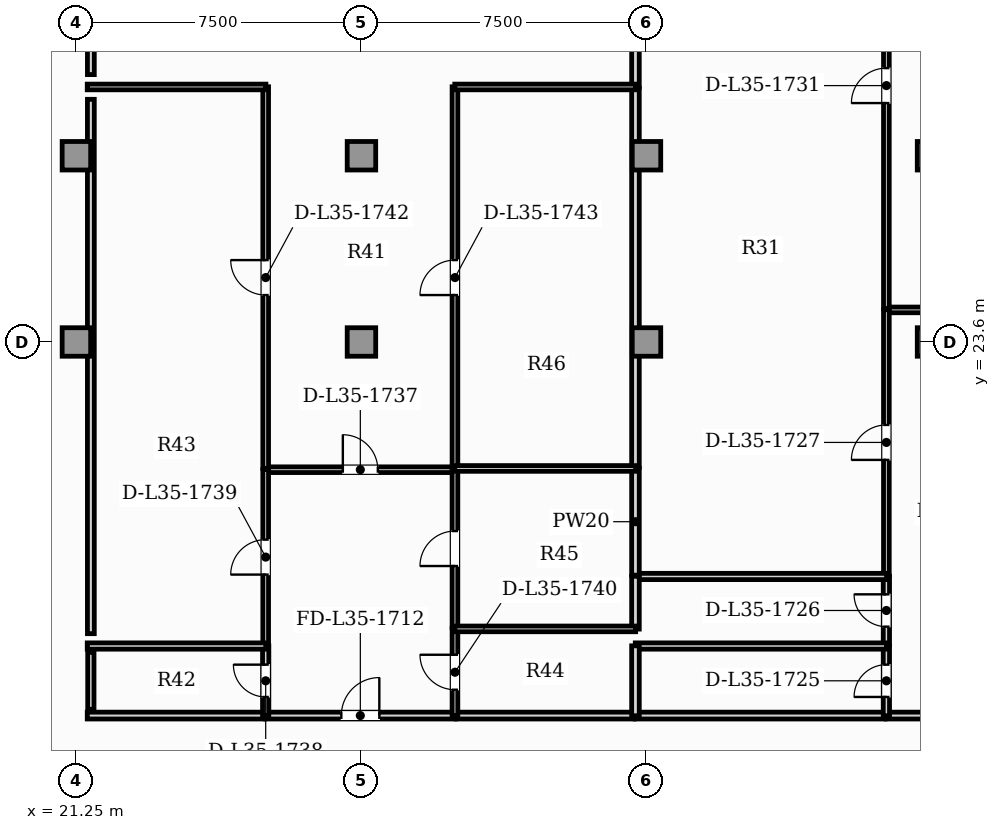
"""IFC4 building model, lengths in metres.
Left out: names, types, materials, properties, quantities, classifications, styles, units other than length and angle.
Written with IfcOpenShell. Run it as: python <this file> out.ifc"""

import sys

from ifc_helpers import new_model, si_unit, direction, frame, frame_2d, origin, origin_2d, place, context, subcontext, project, spatial, rectangle, extrude, element, fill, save


model = new_model("IFC4")
c1 = context("Model", 3, precision=1e-05, world=origin(), true_north=direction((0.0, 1.0)))
c2 = subcontext(c1, "Body", "Model", "MODEL_VIEW")
j1 = project(units=[si_unit("LENGTHUNIT", "METRE"), si_unit("PLANEANGLEUNIT", "RADIAN")], contexts=[c1])
p1 = place(None, origin())
s1 = spatial("IfcSite", under=j1, at=p1, CompositionType="ELEMENT")
p2 = place(p1, origin())
s2 = spatial("IfcBuilding", under=s1, at=p2, CompositionType="ELEMENT")
p3 = place(p2, frame((0.0, 0.0, 145.2)))
s3 = spatial("IfcBuildingStorey", under=s2, at=p3, CompositionType="ELEMENT", Elevation=145.2)
for number, where, z_axis, x_axis in (
    (1, (21.25, 23.6, 0.0), (0.0, 0.0, 1.0), (1.0, 0.0, 0.0)),
    (2, (28.75, 23.6, 0.0), (0.0, 0.0, 1.0), (1.0, 0.0, 0.0)),
    (3, (36.25, 23.6, 0.0), (0.0, 0.0, 1.0), (1.0, 0.0, 0.0)),
    (4, (43.75, 23.6, 0.0), (0.0, 0.0, 1.0), (1.0, 0.0, 0.0)),
    (5, (21.25, 28.5, 0.0), (0.0, 0.0, 1.0), (1.0, 0.0, 0.0)),
    (6, (28.75, 28.5, 0.0), (0.0, 0.0, 1.0), (1.0, 0.0, 0.0)),
    (7, (36.25, 28.5, 0.0), (0.0, 0.0, 1.0), (1.0, 0.0, 0.0)),
    (8, (43.75, 28.5, 0.0), (0.0, 0.0, 1.0), (1.0, 0.0, 0.0)),
):
    element("IfcColumn", number, at=place(p3, frame(where, z_axis=z_axis, x_axis=x_axis)), inside=s3, PredefinedType="COLUMN", context=c2, shape_type="SweptSolid", body=[
        extrude(rectangle(XDim=0.75, YDim=0.75, at=origin_2d()), origin(), (0.0, 0.0, 1.0), 3.85),
    ])
p4 = place(p3, frame((42.557, 13.77, 0.0), z_axis=(0.0, 0.0, 1.0), x_axis=(1.0, 0.0, 0.0)))
e9 = element("IfcWall", 9, at=p4, inside=s3, PredefinedType="PARTITIONING", context=c2, shape_type="SweptSolid", body=[
    extrude(rectangle(XDim=4.99, YDim=0.18, at=frame_2d((2.495, 0.0))), origin(), (0.0, 0.0, 1.0), 3.63),
])
p5 = place(p4, frame((1.995, 0.0, 0.0)))
e10 = element("IfcOpeningElement", 10, at=p5, cuts=e9, PredefinedType="OPENING", context=c2, shape_type="SweptSolid", body=[
    extrude(rectangle(XDim=1.0, YDim=2.15, at=frame_2d((0.5, 1.075))), frame((0.0, 0.1, 0.0), z_axis=(0.0, -1.0, 0.0), x_axis=(1.0, 0.0, 0.0)), (0.0, 0.0, 1.0), 0.2),
])
p6 = place(p3, frame((35.955, 13.77, 0.0), z_axis=(0.0, 0.0, 1.0), x_axis=(1.0, 0.0, 0.0)))
e11 = element("IfcWall", 11, at=p6, inside=s3, PredefinedType="PARTITIONING", context=c2, shape_type="SweptSolid", body=[
    extrude(rectangle(XDim=6.572, YDim=0.18, at=frame_2d((3.286, 0.0))), origin(), (0.0, 0.0, 1.0), 3.63),
])
p7 = place(p3, frame((26.225, 13.77, 0.0), z_axis=(0.0, 0.0, 1.0), x_axis=(1.0, 0.0, 0.0)))
e12 = element("IfcWall", 12, at=p7, inside=s3, PredefinedType="PARTITIONING", context=c2, shape_type="SweptSolid", body=[
    extrude(rectangle(XDim=4.99, YDim=0.18, at=frame_2d((2.495, 0.0))), origin(), (0.0, 0.0, 1.0), 3.63),
])
p8 = place(p7, frame((1.995, 0.0, 0.0)))
e13 = element("IfcOpeningElement", 13, at=p8, cuts=e12, PredefinedType="OPENING", context=c2, shape_type="SweptSolid", body=[
    extrude(rectangle(XDim=1.0, YDim=2.15, at=frame_2d((0.5, 1.075))), frame((0.0, 0.1, 0.0), z_axis=(0.0, -1.0, 0.0), x_axis=(1.0, 0.0, 0.0)), (0.0, 0.0, 1.0), 0.2),
])
p9 = place(p3, frame((21.535, 13.77, 0.0), z_axis=(0.0, 0.0, 1.0), x_axis=(1.0, 0.0, 0.0)))
e14 = element("IfcWall", 14, at=p9, inside=s3, PredefinedType="PARTITIONING", context=c2, shape_type="SweptSolid", body=[
    extrude(rectangle(XDim=4.66, YDim=0.18, at=frame_2d((2.33, 0.0))), origin(), (0.0, 0.0, 1.0), 3.63),
])
p10 = place(p3, frame((31.245, 13.77, 0.0), z_axis=(0.0, 0.0, 1.0), x_axis=(1.0, 0.0, 0.0)))
e15 = element("IfcWall", 15, at=p10, inside=s3, PredefinedType="PARTITIONING", context=c2, shape_type="SweptSolid", body=[
    extrude(rectangle(XDim=4.68, YDim=0.18, at=frame_2d((2.34, 0.0))), origin(), (0.0, 0.0, 1.0), 3.63),
])
p11 = place(p3, frame((42.557, 24.444, 0.0), z_axis=(0.0, 0.0, 1.0), x_axis=(1.0, 0.0, 0.0)))
e16 = element("IfcWall", 16, at=p11, inside=s3, PredefinedType="PARTITIONING", context=c2, shape_type="SweptSolid", body=[
    extrude(rectangle(XDim=4.99, YDim=0.15, at=frame_2d((2.495, 0.0))), origin(), (0.0, 0.0, 1.0), 3.63),
])
p12 = place(p11, frame((2.035, 0.0, 0.0)))
e17 = element("IfcOpeningElement", 17, at=p12, cuts=e16, PredefinedType="OPENING", context=c2, shape_type="SweptSolid", body=[
    extrude(rectangle(XDim=0.92, YDim=2.1, at=frame_2d((0.46, 1.05))), frame((0.0, 0.085, 0.0), z_axis=(0.0, -1.0, 0.0), x_axis=(1.0, 0.0, 0.0)), (0.0, 0.0, 1.0), 0.17),
])
p13 = place(p3, frame((42.562, 13.765, 0.0), z_axis=(0.0, 0.0, 1.0), x_axis=(0.0, 1.0, 0.0)))
e18 = element("IfcWall", 18, at=p13, inside=s3, PredefinedType="PLUMBINGWALL", context=c2, shape_type="SweptSolid", body=[
    extrude(rectangle(XDim=1.84, YDim=0.165, at=frame_2d((0.92, 0.0))), origin(), (0.0, 0.0, 1.0), 3.63),
])
p14 = place(p13, frame((0.495, 0.0, 0.0)))
e19 = element("IfcOpeningElement", 19, at=p14, cuts=e18, PredefinedType="OPENING", context=c2, shape_type="SweptSolid", body=[
    extrude(rectangle(XDim=0.85, YDim=2.1, at=frame_2d((0.425, 1.05))), frame((0.0, 0.093, 0.0), z_axis=(0.0, -1.0, 0.0), x_axis=(1.0, 0.0, 0.0)), (0.0, 0.0, 1.0), 0.185),
])
p15 = place(p3, frame((42.562, 15.635, 0.0), z_axis=(0.0, 0.0, 1.0), x_axis=(0.0, 1.0, 0.0)))
e20 = element("IfcWall", 20, at=p15, inside=s3, PredefinedType="PLUMBINGWALL", context=c2, shape_type="SweptSolid", body=[
    extrude(rectangle(XDim=1.8, YDim=0.165, at=frame_2d((0.9, 0.0))), origin(), (0.0, 0.0, 1.0), 3.63),
])
p16 = place(p15, frame((0.475, 0.0, 0.0)))
e21 = element("IfcOpeningElement", 21, at=p16, cuts=e20, PredefinedType="OPENING", context=c2, shape_type="SweptSolid", body=[
    extrude(rectangle(XDim=0.85, YDim=2.1, at=frame_2d((0.425, 1.05))), frame((0.0, 0.093, 0.0), z_axis=(0.0, -1.0, 0.0), x_axis=(1.0, 0.0, 0.0)), (0.0, 0.0, 1.0), 0.185),
])
p17 = place(p3, frame((42.562, 17.465, 0.0), z_axis=(0.0, 0.0, 1.0), x_axis=(0.0, 1.0, 0.0)))
e22 = element("IfcWall", 22, at=p17, inside=s3, PredefinedType="PARTITIONING", context=c2, shape_type="SweptSolid", body=[
    extrude(rectangle(XDim=6.984, YDim=0.15, at=frame_2d((3.492, 0.0))), origin(), (0.0, 0.0, 1.0), 3.63),
])
p18 = place(p17, frame((3.032, 0.0, 0.0)))
e23 = element("IfcOpeningElement", 23, at=p18, cuts=e22, PredefinedType="OPENING", context=c2, shape_type="SweptSolid", body=[
    extrude(rectangle(XDim=0.92, YDim=2.1, at=frame_2d((0.46, 1.05))), frame((0.0, 0.085, 0.0), z_axis=(0.0, -1.0, 0.0), x_axis=(1.0, 0.0, 0.0)), (0.0, 0.0, 1.0), 0.17),
])
p19 = place(p3, frame((42.562, 24.479, 0.0), z_axis=(0.0, 0.0, 1.0), x_axis=(0.0, 1.0, 0.0)))
e24 = element("IfcWall", 24, at=p19, inside=s3, PredefinedType="PARTITIONING", context=c2, shape_type="SweptSolid", body=[
    extrude(rectangle(XDim=9.026, YDim=0.15, at=frame_2d((4.513, 0.0))), origin(), (0.0, 0.0, 1.0), 3.63),
])
p20 = place(p19, frame((5.407, 0.0, 0.0)))
e25 = element("IfcOpeningElement", 25, at=p20, cuts=e24, PredefinedType="OPENING", context=c2, shape_type="SweptSolid", body=[
    extrude(rectangle(XDim=0.92, YDim=2.1, at=frame_2d((0.46, 1.05))), frame((0.0, 0.085, 0.0), z_axis=(0.0, -1.0, 0.0), x_axis=(1.0, 0.0, 0.0)), (0.0, 0.0, 1.0), 0.17),
])
p21 = place(p3, frame((35.955, 15.6, 0.0), z_axis=(0.0, 0.0, 1.0), x_axis=(1.0, 0.0, 0.0)))
e26 = element("IfcWall", 26, at=p21, inside=s3, PredefinedType="PLUMBINGWALL", context=c2, shape_type="SweptSolid", body=[
    extrude(rectangle(XDim=6.612, YDim=0.165, at=frame_2d((3.306, 0.0))), origin(), (0.0, 0.0, 1.0), 3.63),
])
p22 = place(p3, frame((35.96, 13.765, 0.0), z_axis=(0.0, 0.0, 1.0), x_axis=(0.0, 1.0, 0.0)))
e27 = element("IfcWall", 27, at=p22, inside=s3, PredefinedType="PARTITIONING", context=c2, shape_type="SweptSolid", body=[
    extrude(rectangle(XDim=1.84, YDim=0.2, at=frame_2d((0.92, 0.0))), origin(), (0.0, 0.0, 1.0), 3.63),
])
p23 = place(p3, frame((35.955, 17.43, 0.0), z_axis=(0.0, 0.0, 1.0), x_axis=(1.0, 0.0, 0.0)))
e28 = element("IfcWall", 28, at=p23, inside=s3, PredefinedType="PLUMBINGWALL", context=c2, shape_type="SweptSolid", body=[
    extrude(rectangle(XDim=6.612, YDim=0.165, at=frame_2d((3.306, 0.0))), origin(), (0.0, 0.0, 1.0), 3.63),
])
p24 = place(p3, frame((35.96, 16.046, 0.0), z_axis=(0.0, 0.0, 1.0), x_axis=(0.0, 1.0, 0.0)))
e29 = element("IfcWall", 29, at=p24, inside=s3, PredefinedType="PARTITIONING", context=c2, shape_type="SweptSolid", body=[
    extrude(rectangle(XDim=1.389, YDim=0.2, at=frame_2d((0.695, 0.0))), origin(), (0.0, 0.0, 1.0), 3.63),
])
p25 = place(p3, frame((35.96, 30.305, 0.0), z_axis=(0.0, 0.0, 1.0), x_axis=(0.0, 1.0, 0.0)))
e30 = element("IfcWall", 30, at=p25, inside=s3, PredefinedType="PARTITIONING", context=c2, shape_type="SweptSolid", body=[
    extrude(rectangle(XDim=1.51, YDim=0.2, at=frame_2d((0.755, 0.0))), origin(), (0.0, 0.0, 1.0), 3.63),
])
p26 = place(p3, frame((35.96, 17.465, 0.0), z_axis=(0.0, 0.0, 1.0), x_axis=(0.0, 1.0, 0.0)))
e31 = element("IfcWall", 31, at=p26, inside=s3, PredefinedType="PARTITIONING", context=c2, shape_type="SweptSolid", body=[
    extrude(rectangle(XDim=2.812, YDim=0.2, at=frame_2d((1.406, 0.0))), origin(), (0.0, 0.0, 1.0), 3.63),
])
p27 = place(p3, frame((35.96, 20.308, 0.0), z_axis=(0.0, 0.0, 1.0), x_axis=(0.0, 1.0, 0.0)))
e32 = element("IfcWall", 32, at=p27, inside=s3, PredefinedType="PARTITIONING", context=c2, shape_type="SweptSolid", body=[
    extrude(rectangle(XDim=9.967, YDim=0.2, at=frame_2d((4.984, 0.0))), origin(), (0.0, 0.0, 1.0), 3.63),
])
p28 = place(p3, frame((26.225, 20.239, 0.0), z_axis=(0.0, 0.0, 1.0), x_axis=(1.0, 0.0, 0.0)))
e33 = element("IfcWall", 33, at=p28, inside=s3, PredefinedType="PARTITIONING", context=c2, shape_type="SweptSolid", body=[
    extrude(rectangle(XDim=4.99, YDim=0.15, at=frame_2d((2.495, 0.0))), origin(), (0.0, 0.0, 1.0), 3.63),
])
p29 = place(p28, frame((2.035, 0.0, 0.0)))
e34 = element("IfcOpeningElement", 34, at=p29, cuts=e33, PredefinedType="OPENING", context=c2, shape_type="SweptSolid", body=[
    extrude(rectangle(XDim=0.92, YDim=2.1, at=frame_2d((0.46, 1.05))), frame((0.0, 0.085, 0.0), z_axis=(0.0, -1.0, 0.0), x_axis=(1.0, 0.0, 0.0)), (0.0, 0.0, 1.0), 0.17),
])
p30 = place(p3, frame((26.23, 13.765, 0.0), z_axis=(0.0, 0.0, 1.0), x_axis=(0.0, 1.0, 0.0)))
e35 = element("IfcWall", 35, at=p30, inside=s3, PredefinedType="PLUMBINGWALL", context=c2, shape_type="SweptSolid", body=[
    extrude(rectangle(XDim=1.84, YDim=0.165, at=frame_2d((0.92, 0.0))), origin(), (0.0, 0.0, 1.0), 3.63),
])
p31 = place(p30, frame((0.495, 0.0, 0.0)))
e36 = element("IfcOpeningElement", 36, at=p31, cuts=e35, PredefinedType="OPENING", context=c2, shape_type="SweptSolid", body=[
    extrude(rectangle(XDim=0.85, YDim=2.1, at=frame_2d((0.425, 1.05))), frame((0.0, 0.093, 0.0), z_axis=(0.0, -1.0, 0.0), x_axis=(1.0, 0.0, 0.0)), (0.0, 0.0, 1.0), 0.185),
])
p32 = place(p3, frame((26.23, 15.635, 0.0), z_axis=(0.0, 0.0, 1.0), x_axis=(0.0, 1.0, 0.0)))
e37 = element("IfcWall", 37, at=p32, inside=s3, PredefinedType="PARTITIONING", context=c2, shape_type="SweptSolid", body=[
    extrude(rectangle(XDim=4.609, YDim=0.15, at=frame_2d((2.305, 0.0))), origin(), (0.0, 0.0, 1.0), 3.63),
])
p33 = place(p32, frame((1.844, 0.0, 0.0)))
e38 = element("IfcOpeningElement", 38, at=p33, cuts=e37, PredefinedType="OPENING", context=c2, shape_type="SweptSolid", body=[
    extrude(rectangle(XDim=0.92, YDim=2.1, at=frame_2d((0.46, 1.05))), frame((0.0, 0.085, 0.0), z_axis=(0.0, -1.0, 0.0), x_axis=(1.0, 0.0, 0.0)), (0.0, 0.0, 1.0), 0.17),
])
p34 = place(p3, frame((31.21, 13.765, 0.0), z_axis=(0.0, 0.0, 1.0), x_axis=(0.0, 1.0, 0.0)))
e39 = element("IfcWall", 39, at=p34, inside=s3, PredefinedType="PARTITIONING", context=c2, shape_type="SweptSolid", body=[
    extrude(rectangle(XDim=2.291, YDim=0.15, at=frame_2d((1.146, 0.0))), origin(), (0.0, 0.0, 1.0), 3.63),
])
p35 = place(p34, frame((0.685, 0.0, 0.0)))
e40 = element("IfcOpeningElement", 40, at=p35, cuts=e39, PredefinedType="OPENING", context=c2, shape_type="SweptSolid", body=[
    extrude(rectangle(XDim=0.92, YDim=2.1, at=frame_2d((0.46, 1.05))), frame((0.0, 0.085, 0.0), z_axis=(0.0, -1.0, 0.0), x_axis=(1.0, 0.0, 0.0)), (0.0, 0.0, 1.0), 0.17),
])
p36 = place(p3, frame((31.21, 16.086, 0.0), z_axis=(0.0, 0.0, 1.0), x_axis=(0.0, 1.0, 0.0)))
e41 = element("IfcWall", 41, at=p36, inside=s3, PredefinedType="PARTITIONING", context=c2, shape_type="SweptSolid", body=[
    extrude(rectangle(XDim=4.159, YDim=0.15, at=frame_2d((2.079, 0.0))), origin(), (0.0, 0.0, 1.0), 3.63),
])
p37 = place(p36, frame((1.619, 0.0, 0.0)))
e42 = element("IfcOpeningElement", 42, at=p37, cuts=e41, PredefinedType="OPENING", context=c2, shape_type="SweptSolid", body=[
    extrude(rectangle(XDim=0.92, YDim=2.1, at=frame_2d((0.46, 1.05))), frame((0.0, 0.085, 0.0), z_axis=(0.0, -1.0, 0.0), x_axis=(1.0, 0.0, 0.0)), (0.0, 0.0, 1.0), 0.17),
])
p38 = place(p3, frame((26.23, 20.274, 0.0), z_axis=(0.0, 0.0, 1.0), x_axis=(0.0, 1.0, 0.0)))
e43 = element("IfcWall", 43, at=p38, inside=s3, PredefinedType="PARTITIONING", context=c2, shape_type="SweptSolid", body=[
    extrude(rectangle(XDim=10.041, YDim=0.15, at=frame_2d((5.02, 0.0))), origin(), (0.0, 0.0, 1.0), 3.63),
])
p39 = place(p38, frame((4.56, 0.0, 0.0)))
e44 = element("IfcOpeningElement", 44, at=p39, cuts=e43, PredefinedType="OPENING", context=c2, shape_type="SweptSolid", body=[
    extrude(rectangle(XDim=0.92, YDim=2.1, at=frame_2d((0.46, 1.05))), frame((0.0, 0.085, 0.0), z_axis=(0.0, -1.0, 0.0), x_axis=(1.0, 0.0, 0.0)), (0.0, 0.0, 1.0), 0.17),
])
p40 = place(p3, frame((21.535, 30.31, 0.0), z_axis=(0.0, 0.0, 1.0), x_axis=(1.0, 0.0, 0.0)))
e45 = element("IfcWall", 45, at=p40, inside=s3, PredefinedType="PARTITIONING", context=c2, shape_type="SweptSolid", body=[
    extrude(rectangle(XDim=4.7, YDim=0.15, at=frame_2d((2.35, 0.0))), origin(), (0.0, 0.0, 1.0), 3.63),
])
p41 = place(p3, frame((31.21, 20.274, 0.0), z_axis=(0.0, 0.0, 1.0), x_axis=(0.0, 1.0, 0.0)))
e46 = element("IfcWall", 46, at=p41, inside=s3, PredefinedType="PARTITIONING", context=c2, shape_type="SweptSolid", body=[
    extrude(rectangle(XDim=10.041, YDim=0.15, at=frame_2d((5.02, 0.0))), origin(), (0.0, 0.0, 1.0), 3.63),
])
p42 = place(p41, frame((4.56, 0.0, 0.0)))
e47 = element("IfcOpeningElement", 47, at=p42, cuts=e46, PredefinedType="OPENING", context=c2, shape_type="SweptSolid", body=[
    extrude(rectangle(XDim=0.92, YDim=2.1, at=frame_2d((0.46, 1.05))), frame((0.0, 0.085, 0.0), z_axis=(0.0, -1.0, 0.0), x_axis=(1.0, 0.0, 0.0)), (0.0, 0.0, 1.0), 0.17),
])
p43 = place(p3, frame((31.205, 30.31, 0.0), z_axis=(0.0, 0.0, 1.0), x_axis=(1.0, 0.0, 0.0)))
e48 = element("IfcWall", 48, at=p43, inside=s3, PredefinedType="PARTITIONING", context=c2, shape_type="SweptSolid", body=[
    extrude(rectangle(XDim=4.76, YDim=0.15, at=frame_2d((2.38, 0.0))), origin(), (0.0, 0.0, 1.0), 3.63),
])
p44 = place(p3, frame((21.535, 15.6, 0.0), z_axis=(0.0, 0.0, 1.0), x_axis=(1.0, 0.0, 0.0)))
e49 = element("IfcWall", 49, at=p44, inside=s3, PredefinedType="PLUMBINGWALL", context=c2, shape_type="SweptSolid", body=[
    extrude(rectangle(XDim=4.7, YDim=0.165, at=frame_2d((2.35, 0.0))), origin(), (0.0, 0.0, 1.0), 3.63),
])
for number, where, z_axis, x_axis in (
    (50, (31.205, 16.051, 0.0), (0.0, 0.0, 1.0), (1.0, 0.0, 0.0)),
    (51, (31.205, 20.272, 0.0), (0.0, 0.0, 1.0), (1.0, 0.0, 0.0)),
):
    element("IfcWall", number, at=place(p3, frame(where, z_axis=z_axis, x_axis=x_axis)), inside=s3, PredefinedType="PARTITIONING", context=c2, shape_type="SweptSolid", body=[
        extrude(rectangle(XDim=4.76, YDim=0.15, at=frame_2d((2.38, 0.0))), origin(), (0.0, 0.0, 1.0), 3.63),
    ])
p45 = place(p3, frame((21.63, 30.635, 0.0), z_axis=(0.0, 0.0, 1.0), x_axis=(0.0, 1.0, 0.0)))
e52 = element("IfcWall", 52, at=p45, inside=s3, PredefinedType="PARTITIONING", context=c2, shape_type="SweptSolid", body=[
    extrude(rectangle(XDim=0.85, YDim=0.18, at=frame_2d((0.425, 0.0))), origin(), (0.0, 0.0, 1.0), 3.63),
])
p46 = place(p3, frame((21.63, 13.935, 0.0), z_axis=(0.0, 0.0, 1.0), x_axis=(0.0, 1.0, 0.0)))
e53 = element("IfcWall", 53, at=p46, inside=s3, PredefinedType="PLUMBINGWALL", context=c2, shape_type="SweptSolid", body=[
    extrude(rectangle(XDim=1.5, YDim=0.165, at=frame_2d((0.75, 0.0))), origin(), (0.0, 0.0, 1.0), 3.63),
])
p47 = place(p3, frame((21.63, 15.925, 0.0), z_axis=(0.0, 0.0, 1.0), x_axis=(0.0, 1.0, 0.0)))
e54 = element("IfcWall", 54, at=p47, inside=s3, PredefinedType="PARTITIONING", context=c2, shape_type="SweptSolid", body=[
    extrude(rectangle(XDim=14.06, YDim=0.18, at=frame_2d((7.03, 0.0))), origin(), (0.0, 0.0, 1.0), 3.63),
])
p48 = place(p8, origin())
e55 = element("IfcDoor", 55, at=p48, inside=s3, OperationType="SINGLE_SWING_RIGHT", PredefinedType="DOOR", context=c2, shape_type="SweptSolid", body=[
    extrude(rectangle(XDim=1.0, YDim=2.15, at=frame_2d((0.5, 1.075))), frame((0.0, 0.025, 0.0), z_axis=(0.0, -1.0, 0.0), x_axis=(1.0, 0.0, 0.0)), (0.0, 0.0, 1.0), 0.05),
])
fill(e13, e55)
p49 = place(p14, origin())
e56 = element("IfcDoor", 56, at=p49, inside=s3, OperationType="SINGLE_SWING_LEFT", PredefinedType="DOOR", context=c2, shape_type="SweptSolid", body=[
    extrude(rectangle(XDim=0.85, YDim=2.1, at=frame_2d((0.425, 1.05))), frame((0.0, 0.025, 0.0), z_axis=(0.0, -1.0, 0.0), x_axis=(1.0, 0.0, 0.0)), (0.0, 0.0, 1.0), 0.05),
])
fill(e19, e56)
p50 = place(p16, origin())
e57 = element("IfcDoor", 57, at=p50, inside=s3, OperationType="SINGLE_SWING_RIGHT", PredefinedType="DOOR", context=c2, shape_type="SweptSolid", body=[
    extrude(rectangle(XDim=0.85, YDim=2.1, at=frame_2d((0.425, 1.05))), frame((0.0, 0.025, 0.0), z_axis=(0.0, -1.0, 0.0), x_axis=(1.0, 0.0, 0.0)), (0.0, 0.0, 1.0), 0.05),
])
fill(e21, e57)
p51 = place(p18, origin())
e58 = element("IfcDoor", 58, at=p51, inside=s3, OperationType="SINGLE_SWING_LEFT", PredefinedType="DOOR", context=c2, shape_type="SweptSolid", body=[
    extrude(rectangle(XDim=0.92, YDim=2.1, at=frame_2d((0.46, 1.05))), frame((0.0, 0.025, 0.0), z_axis=(0.0, -1.0, 0.0), x_axis=(1.0, 0.0, 0.0)), (0.0, 0.0, 1.0), 0.05),
])
fill(e23, e58)
p52 = place(p20, origin())
e59 = element("IfcDoor", 59, at=p52, inside=s3, OperationType="SINGLE_SWING_LEFT", PredefinedType="DOOR", context=c2, shape_type="SweptSolid", body=[
    extrude(rectangle(XDim=0.92, YDim=2.1, at=frame_2d((0.46, 1.05))), frame((0.0, 0.025, 0.0), z_axis=(0.0, -1.0, 0.0), x_axis=(1.0, 0.0, 0.0)), (0.0, 0.0, 1.0), 0.05),
])
fill(e25, e59)
p53 = place(p29, origin())
e60 = element("IfcDoor", 60, at=p53, inside=s3, OperationType="SINGLE_SWING_LEFT", PredefinedType="DOOR", context=c2, shape_type="SweptSolid", body=[
    extrude(rectangle(XDim=0.92, YDim=2.1, at=frame_2d((0.46, 1.05))), frame((0.0, 0.025, 0.0), z_axis=(0.0, -1.0, 0.0), x_axis=(1.0, 0.0, 0.0)), (0.0, 0.0, 1.0), 0.05),
])
fill(e34, e60)
p54 = place(p31, origin())
e61 = element("IfcDoor", 61, at=p54, inside=s3, OperationType="SINGLE_SWING_RIGHT", PredefinedType="DOOR", context=c2, shape_type="SweptSolid", body=[
    extrude(rectangle(XDim=0.85, YDim=2.1, at=frame_2d((0.425, 1.05))), frame((0.0, 0.025, 0.0), z_axis=(0.0, -1.0, 0.0), x_axis=(1.0, 0.0, 0.0)), (0.0, 0.0, 1.0), 0.05),
])
fill(e36, e61)
p55 = place(p33, origin())
e62 = element("IfcDoor", 62, at=p55, inside=s3, OperationType="SINGLE_SWING_LEFT", PredefinedType="DOOR", context=c2, shape_type="SweptSolid", body=[
    extrude(rectangle(XDim=0.92, YDim=2.1, at=frame_2d((0.46, 1.05))), frame((0.0, 0.025, 0.0), z_axis=(0.0, -1.0, 0.0), x_axis=(1.0, 0.0, 0.0)), (0.0, 0.0, 1.0), 0.05),
])
fill(e38, e62)
p56 = place(p35, origin())
e63 = element("IfcDoor", 63, at=p56, inside=s3, OperationType="SINGLE_SWING_RIGHT", PredefinedType="DOOR", context=c2, shape_type="SweptSolid", body=[
    extrude(rectangle(XDim=0.92, YDim=2.1, at=frame_2d((0.46, 1.05))), frame((0.0, 0.025, 0.0), z_axis=(0.0, -1.0, 0.0), x_axis=(1.0, 0.0, 0.0)), (0.0, 0.0, 1.0), 0.05),
])
fill(e40, e63)
p57 = place(p37, origin())
e64 = element("IfcDoor", 64, at=p57, inside=s3, OperationType="SINGLE_SWING_LEFT", PredefinedType="DOOR", context=c2, shape_type="SweptSolid", body=[
    extrude(rectangle(XDim=0.92, YDim=2.1, at=frame_2d((0.46, 1.05))), frame((0.0, 0.025, 0.0), z_axis=(0.0, -1.0, 0.0), x_axis=(1.0, 0.0, 0.0)), (0.0, 0.0, 1.0), 0.05),
])
fill(e42, e64)
p58 = place(p39, origin())
e65 = element("IfcDoor", 65, at=p58, inside=s3, OperationType="SINGLE_SWING_RIGHT", PredefinedType="DOOR", context=c2, shape_type="SweptSolid", body=[
    extrude(rectangle(XDim=0.92, YDim=2.1, at=frame_2d((0.46, 1.05))), frame((0.0, 0.025, 0.0), z_axis=(0.0, -1.0, 0.0), x_axis=(1.0, 0.0, 0.0)), (0.0, 0.0, 1.0), 0.05),
])
fill(e44, e65)
p59 = place(p42, origin())
e66 = element("IfcDoor", 66, at=p59, inside=s3, OperationType="SINGLE_SWING_LEFT", PredefinedType="DOOR", context=c2, shape_type="SweptSolid", body=[
    extrude(rectangle(XDim=0.92, YDim=2.1, at=frame_2d((0.46, 1.05))), frame((0.0, 0.025, 0.0), z_axis=(0.0, -1.0, 0.0), x_axis=(1.0, 0.0, 0.0)), (0.0, 0.0, 1.0), 0.05),
])
fill(e47, e66)
save(model, sys.argv[1])
